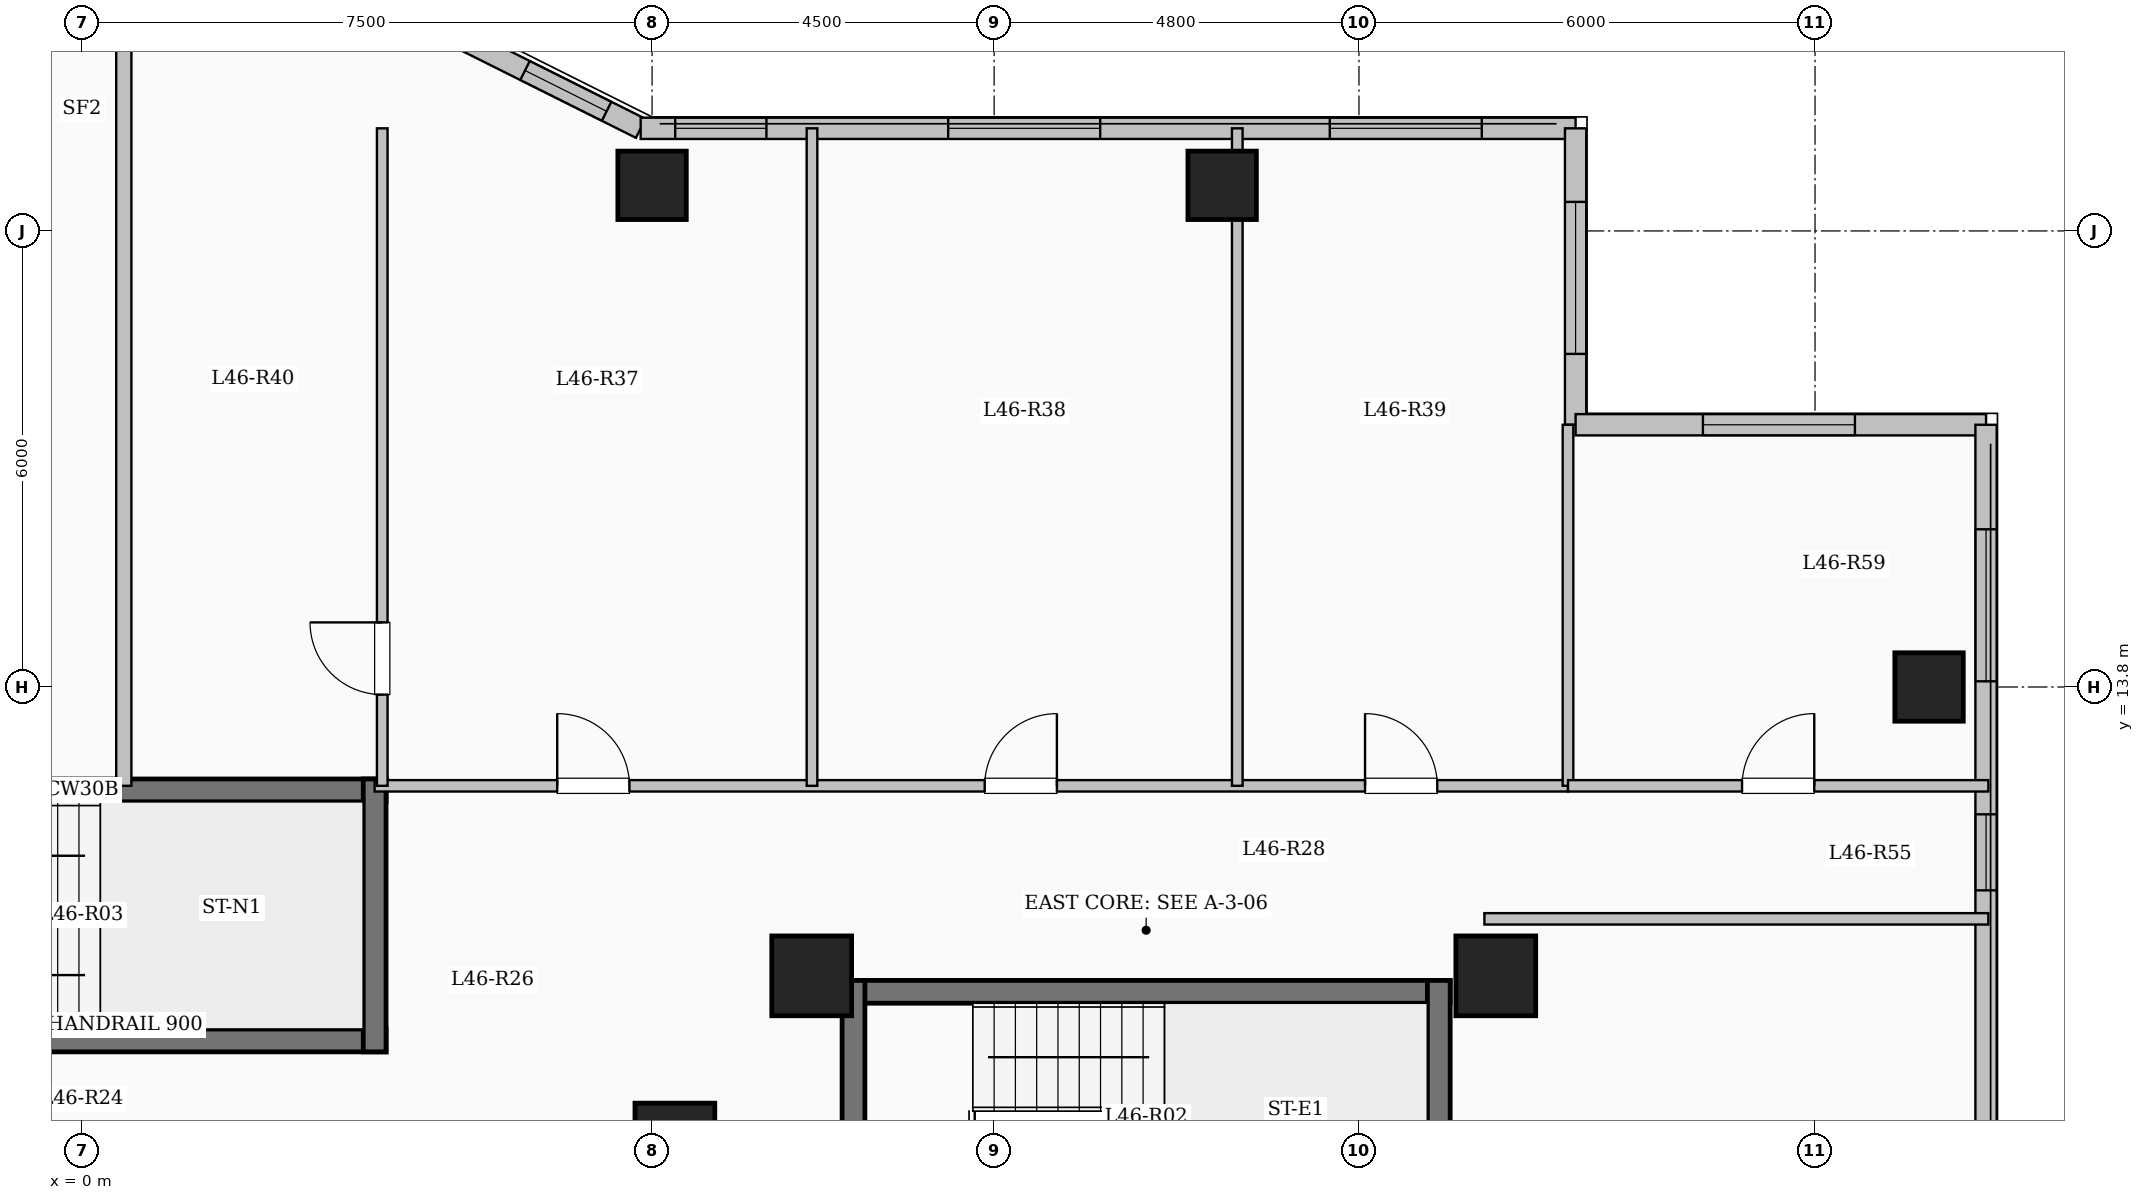
"""IFC4 building model, lengths in metres.
Left out: names, types, materials, properties, quantities, classifications, styles, units other than length and angle.
Written with IfcOpenShell. Run it as: python <this file> out.ifc"""

import sys

from ifc_helpers import new_model, si_unit, direction, frame, frame_2d, origin, origin_2d, place, context, subcontext, project, spatial, rectangle, extrude, element, fill, save


model = new_model("IFC4")
c1 = context("Model", 3, precision=1e-05, world=origin(), true_north=direction((0.0, 1.0)))
c2 = subcontext(c1, "Body", "Model", "MODEL_VIEW")
j1 = project(units=[si_unit("LENGTHUNIT", "METRE"), si_unit("PLANEANGLEUNIT", "RADIAN")], contexts=[c1])
p1 = place(None, origin())
s1 = spatial("IfcSite", under=j1, at=p1, CompositionType="ELEMENT")
p2 = place(p1, origin())
s2 = spatial("IfcBuilding", under=s1, at=p2, CompositionType="ELEMENT")
p3 = place(p2, frame((0.0, 0.0, 169.45)))
s3 = spatial("IfcBuildingStorey", under=s2, at=p3, CompositionType="ELEMENT", Elevation=169.45)
for number, where, z_axis, x_axis in (
    (1, (7.8, 7.8, 0.0), (0.0, 0.0, 1.0), (1.0, 0.0, 0.0)),
    (2, (9.6, 10.0, 0.0), (0.0, 0.0, 1.0), (1.0, 0.0, 0.0)),
    (3, (18.6, 10.0, 0.0), (0.0, 0.0, 1.0), (1.0, 0.0, 0.0)),
):
    element("IfcColumn", number, at=place(p3, frame(where, z_axis=z_axis, x_axis=x_axis)), inside=s3, PredefinedType="COLUMN", context=c2, shape_type="SweptSolid", body=[
        extrude(rectangle(XDim=1.05, YDim=1.05, at=origin_2d()), origin(), (0.0, 0.0, 1.0), 3.35),
    ])
for number, where, z_axis, x_axis in (
    (4, (7.5, 20.4, 0.0), (0.0, 0.0, 1.0), (1.0, 0.0, 0.0)),
    (5, (15.0, 20.4, 0.0), (0.0, 0.0, 1.0), (1.0, 0.0, 0.0)),
    (6, (24.3, 13.8, 0.0), (0.0, 0.0, 1.0), (1.0, 0.0, 0.0)),
):
    element("IfcColumn", number, at=place(p3, frame(where, z_axis=z_axis, x_axis=x_axis)), inside=s3, PredefinedType="COLUMN", context=c2, shape_type="SweptSolid", body=[
        extrude(rectangle(XDim=0.9, YDim=0.9, at=origin_2d()), origin(), (0.0, 0.0, 1.0), 3.35),
    ])
p4 = place(p3, frame((4.35, 22.65, 0.0), z_axis=(0.0, 0.0, 1.0), x_axis=(0.894427191, -0.4472135955, 0.0)))
e7 = element("IfcWall", 7, at=p4, inside=s3, PredefinedType="SOLIDWALL", context=c2, shape_type="SweptSolid", body=[
    extrude(rectangle(XDim=3.354, YDim=0.28, at=frame_2d((1.677, 0.0))), origin(), (0.0, 0.0, 1.0), 3.05),
])
p5 = place(p4, frame((1.653, 0.0, 0.95)))
e8 = element("IfcOpeningElement", 8, at=p5, cuts=e7, PredefinedType="OPENING", context=c2, shape_type="SweptSolid", body=[
    extrude(rectangle(XDim=1.2, YDim=1.5, at=frame_2d((0.6, 0.75))), frame((0.0, 0.15, 0.0), z_axis=(0.0, -1.0, 0.0), x_axis=(1.0, 0.0, 0.0)), (0.0, 0.0, 1.0), 0.3),
])
p6 = place(p3, frame((7.35, 21.15, 0.0), z_axis=(0.0, 0.0, 1.0), x_axis=(1.0, 0.0, 0.0)))
e9 = element("IfcWall", 9, at=p6, inside=s3, PredefinedType="SOLIDWALL", context=c2, shape_type="SweptSolid", body=[
    extrude(rectangle(XDim=12.3, YDim=0.28, at=frame_2d((6.15, 0.0))), origin(), (0.0, 0.0, 1.0), 3.05),
])
p7 = place(p6, frame((0.454, 0.0, 0.95)))
e10 = element("IfcOpeningElement", 10, at=p7, cuts=e9, PredefinedType="OPENING", context=c2, shape_type="SweptSolid", body=[
    extrude(rectangle(XDim=1.2, YDim=1.5, at=frame_2d((0.6, 0.75))), frame((0.0, 0.15, 0.0), z_axis=(0.0, -1.0, 0.0), x_axis=(1.0, 0.0, 0.0)), (0.0, 0.0, 1.0), 0.3),
])
p8 = place(p6, frame((4.045, 0.0, 0.9)))
e11 = element("IfcOpeningElement", 11, at=p8, cuts=e9, PredefinedType="OPENING", context=c2, shape_type="SweptSolid", body=[
    extrude(rectangle(XDim=2.0, YDim=1.7, at=frame_2d((1.0, 0.85))), frame((0.0, 0.15, 0.0), z_axis=(0.0, -1.0, 0.0), x_axis=(1.0, 0.0, 0.0)), (0.0, 0.0, 1.0), 0.3),
])
p9 = place(p6, frame((9.066, 0.0, 0.9)))
e12 = element("IfcOpeningElement", 12, at=p9, cuts=e9, PredefinedType="OPENING", context=c2, shape_type="SweptSolid", body=[
    extrude(rectangle(XDim=2.0, YDim=1.7, at=frame_2d((1.0, 0.85))), frame((0.0, 0.15, 0.0), z_axis=(0.0, -1.0, 0.0), x_axis=(1.0, 0.0, 0.0)), (0.0, 0.0, 1.0), 0.3),
])
p10 = place(p3, frame((19.65, 21.15, 0.0), z_axis=(0.0, 0.0, 1.0), x_axis=(0.0, -1.0, 0.0)))
e13 = element("IfcWall", 13, at=p10, inside=s3, PredefinedType="SOLIDWALL", context=c2, shape_type="SweptSolid", body=[
    extrude(rectangle(XDim=3.9, YDim=0.28, at=frame_2d((1.95, 0.0))), origin(), (0.0, 0.0, 1.0), 3.05),
])
p11 = place(p10, frame((0.968, 0.0, 0.9)))
e14 = element("IfcOpeningElement", 14, at=p11, cuts=e13, PredefinedType="OPENING", context=c2, shape_type="SweptSolid", body=[
    extrude(rectangle(XDim=2.0, YDim=1.7, at=frame_2d((1.0, 0.85))), frame((0.0, 0.15, 0.0), z_axis=(0.0, -1.0, 0.0), x_axis=(1.0, 0.0, 0.0)), (0.0, 0.0, 1.0), 0.3),
])
p12 = place(p3, frame((19.65, 17.25, 0.0), z_axis=(0.0, 0.0, 1.0), x_axis=(1.0, 0.0, 0.0)))
e15 = element("IfcWall", 15, at=p12, inside=s3, PredefinedType="SOLIDWALL", context=c2, shape_type="SweptSolid", body=[
    extrude(rectangle(XDim=5.4, YDim=0.28, at=frame_2d((2.7, 0.0))), origin(), (0.0, 0.0, 1.0), 3.05),
])
p13 = place(p12, frame((1.675, 0.0, 0.9)))
e16 = element("IfcOpeningElement", 16, at=p13, cuts=e15, PredefinedType="OPENING", context=c2, shape_type="SweptSolid", body=[
    extrude(rectangle(XDim=2.0, YDim=1.7, at=frame_2d((1.0, 0.85))), frame((0.0, 0.15, 0.0), z_axis=(0.0, -1.0, 0.0), x_axis=(1.0, 0.0, 0.0)), (0.0, 0.0, 1.0), 0.3),
])
p14 = place(p3, frame((25.05, 17.25, 0.0), z_axis=(0.0, 0.0, 1.0), x_axis=(0.0, -1.0, 0.0)))
e17 = element("IfcWall", 17, at=p14, inside=s3, PredefinedType="SOLIDWALL", context=c2, shape_type="SweptSolid", body=[
    extrude(rectangle(XDim=34.5, YDim=0.28, at=frame_2d((17.25, 0.0))), origin(), (0.0, 0.0, 1.0), 3.05),
])
p15 = place(p14, frame((1.375, 0.0, 0.9)))
e18 = element("IfcOpeningElement", 18, at=p15, cuts=e17, PredefinedType="OPENING", context=c2, shape_type="SweptSolid", body=[
    extrude(rectangle(XDim=2.0, YDim=1.7, at=frame_2d((1.0, 0.85))), frame((0.0, 0.15, 0.0), z_axis=(0.0, -1.0, 0.0), x_axis=(1.0, 0.0, 0.0)), (0.0, 0.0, 1.0), 0.3),
])
p16 = place(p14, frame((5.125, 0.0, 0.95)))
e19 = element("IfcOpeningElement", 19, at=p16, cuts=e17, PredefinedType="OPENING", context=c2, shape_type="SweptSolid", body=[
    extrude(rectangle(XDim=1.0, YDim=1.5, at=frame_2d((0.5, 0.75))), frame((0.0, 0.15, 0.0), z_axis=(0.0, -1.0, 0.0), x_axis=(1.0, 0.0, 0.0)), (0.0, 0.0, 1.0), 0.3),
])
p17 = place(p14, frame((14.5, 0.0, 0.9)))
e20 = element("IfcOpeningElement", 20, at=p17, cuts=e17, PredefinedType="OPENING", context=c2, shape_type="SweptSolid", body=[
    extrude(rectangle(XDim=2.0, YDim=1.7, at=frame_2d((1.0, 0.85))), frame((0.0, 0.15, 0.0), z_axis=(0.0, -1.0, 0.0), x_axis=(1.0, 0.0, 0.0)), (0.0, 0.0, 1.0), 0.3),
])
p18 = place(p14, frame((25.258, 0.0, 0.9)))
e21 = element("IfcOpeningElement", 21, at=p18, cuts=e17, PredefinedType="OPENING", context=c2, shape_type="SweptSolid", body=[
    extrude(rectangle(XDim=1.5, YDim=1.65, at=frame_2d((0.75, 0.825))), frame((0.0, 0.15, 0.0), z_axis=(0.0, -1.0, 0.0), x_axis=(1.0, 0.0, 0.0)), (0.0, 0.0, 1.0), 0.3),
])
p19 = place(p14, frame((29.95, 0.0, 0.9)))
e22 = element("IfcOpeningElement", 22, at=p19, cuts=e17, PredefinedType="OPENING", context=c2, shape_type="SweptSolid", body=[
    extrude(rectangle(XDim=2.2, YDim=1.75, at=frame_2d((1.1, 0.875))), frame((0.0, 0.15, 0.0), z_axis=(0.0, -1.0, 0.0), x_axis=(1.0, 0.0, 0.0)), (0.0, 0.0, 1.0), 0.3),
])
p20 = place(p3, frame((10.0, 9.79, 0.0), z_axis=(0.0, 0.0, 1.0), x_axis=(1.0, 0.0, 0.0)))
e23 = element("IfcWall", 23, at=p20, inside=s3, PredefinedType="SHEAR", context=c2, shape_type="SweptSolid", body=[
    extrude(rectangle(XDim=8.0, YDim=0.3, at=frame_2d((4.0, 0.0))), origin(), (0.0, 0.0, 1.0), 3.35),
])
for number, where, z_axis, x_axis in (
    (24, (10.15, 6.35, 0.0), (0.0, 0.0, 1.0), (0.0, 1.0, 0.0)),
    (25, (17.85, 6.35, 0.0), (0.0, 0.0, 1.0), (0.0, 1.0, 0.0)),
):
    element("IfcWall", number, at=place(p3, frame(where, z_axis=z_axis, x_axis=x_axis)), inside=s3, PredefinedType="SHEAR", context=c2, shape_type="SweptSolid", body=[
        extrude(rectangle(XDim=3.59, YDim=0.3, at=frame_2d((1.795, 0.0))), origin(), (0.0, 0.0, 1.0), 3.35),
    ])
p21 = place(p3, frame((-4.0, 12.44, 0.0), z_axis=(0.0, 0.0, 1.0), x_axis=(1.0, 0.0, 0.0)))
e26 = element("IfcWall", 26, at=p21, inside=s3, PredefinedType="SHEAR", context=c2, shape_type="SweptSolid", body=[
    extrude(rectangle(XDim=8.0, YDim=0.3, at=frame_2d((4.0, 0.0))), origin(), (0.0, 0.0, 1.0), 3.35),
])
p22 = place(p3, frame((-4.0, 9.15, 0.0), z_axis=(0.0, 0.0, 1.0), x_axis=(1.0, 0.0, 0.0)))
e27 = element("IfcWall", 27, at=p22, inside=s3, PredefinedType="SHEAR", context=c2, shape_type="SweptSolid", body=[
    extrude(rectangle(XDim=8.0, YDim=0.3, at=frame_2d((4.0, 0.0))), origin(), (0.0, 0.0, 1.0), 3.35),
])
p23 = place(p22, frame((0.55, 0.0, 0.0)))
e28 = element("IfcOpeningElement", 28, at=p23, cuts=e27, PredefinedType="OPENING", context=c2, shape_type="SweptSolid", body=[
    extrude(rectangle(XDim=1.0, YDim=2.15, at=frame_2d((0.5, 1.075))), frame((0.0, 0.16, 0.0), z_axis=(0.0, -1.0, 0.0), x_axis=(1.0, 0.0, 0.0)), (0.0, 0.0, 1.0), 0.32),
])
p24 = place(p3, frame((3.85, 9.0, 0.0), z_axis=(0.0, 0.0, 1.0), x_axis=(0.0, 1.0, 0.0)))
e29 = element("IfcWall", 29, at=p24, inside=s3, PredefinedType="SHEAR", context=c2, shape_type="SweptSolid", body=[
    extrude(rectangle(XDim=3.59, YDim=0.3, at=frame_2d((1.795, 0.0))), origin(), (0.0, 0.0, 1.0), 3.35),
])
p25 = place(p3, frame((3.85, 12.5, 0.0), z_axis=(0.0, 0.0, 1.0), x_axis=(1.0, 0.0, 0.0)))
e30 = element("IfcWall", 30, at=p25, inside=s3, PredefinedType="PARTITIONING", context=c2, shape_type="SweptSolid", body=[
    extrude(rectangle(XDim=15.7, YDim=0.15, at=frame_2d((7.85, 0.0))), origin(), (0.0, 0.0, 1.0), 3.05),
])
p26 = place(p25, frame((2.402, 0.0, 0.0)))
e31 = element("IfcOpeningElement", 31, at=p26, cuts=e30, PredefinedType="OPENING", context=c2, shape_type="SweptSolid", body=[
    extrude(rectangle(XDim=0.95, YDim=2.15, at=frame_2d((0.475, 1.075))), frame((0.0, 0.085, 0.0), z_axis=(0.0, -1.0, 0.0), x_axis=(1.0, 0.0, 0.0)), (0.0, 0.0, 1.0), 0.17),
])
p27 = place(p25, frame((8.026, 0.0, 0.0)))
e32 = element("IfcOpeningElement", 32, at=p27, cuts=e30, PredefinedType="OPENING", context=c2, shape_type="SweptSolid", body=[
    extrude(rectangle(XDim=0.95, YDim=2.15, at=frame_2d((0.475, 1.075))), frame((0.0, 0.085, 0.0), z_axis=(0.0, -1.0, 0.0), x_axis=(1.0, 0.0, 0.0)), (0.0, 0.0, 1.0), 0.17),
])
p28 = place(p25, frame((13.03, 0.0, 0.0)))
e33 = element("IfcOpeningElement", 33, at=p28, cuts=e30, PredefinedType="OPENING", context=c2, shape_type="SweptSolid", body=[
    extrude(rectangle(XDim=0.95, YDim=2.15, at=frame_2d((0.475, 1.075))), frame((0.0, 0.085, 0.0), z_axis=(0.0, -1.0, 0.0), x_axis=(1.0, 0.0, 0.0)), (0.0, 0.0, 1.0), 0.17),
])
p29 = place(p3, frame((0.55, 12.5, 0.0), z_axis=(0.0, 0.0, 1.0), x_axis=(0.0, 1.0, 0.0)))
e34 = element("IfcWall", 34, at=p29, inside=s3, PredefinedType="SOLIDWALL", context=c2, shape_type="SweptSolid", body=[
    extrude(rectangle(XDim=10.18, YDim=0.2, at=frame_2d((5.09, 0.0))), origin(), (0.0, 0.0, 1.0), 3.05),
])
p30 = place(p3, frame((3.95, 12.5, 0.0), z_axis=(0.0, 0.0, 1.0), x_axis=(0.0, 1.0, 0.0)))
e35 = element("IfcWall", 35, at=p30, inside=s3, PredefinedType="PARTITIONING", context=c2, shape_type="SweptSolid", body=[
    extrude(rectangle(XDim=8.65, YDim=0.14, at=frame_2d((4.325, 0.0))), origin(), (0.0, 0.0, 1.0), 3.05),
])
p31 = place(p30, frame((1.2, 0.0, 0.0)))
e36 = element("IfcOpeningElement", 36, at=p31, cuts=e35, PredefinedType="OPENING", context=c2, shape_type="SweptSolid", body=[
    extrude(rectangle(XDim=0.95, YDim=2.15, at=frame_2d((0.475, 1.075))), frame((0.0, 0.08, 0.0), z_axis=(0.0, -1.0, 0.0), x_axis=(1.0, 0.0, 0.0)), (0.0, 0.0, 1.0), 0.16),
])
p32 = place(p3, frame((9.604, 12.5, 0.0), z_axis=(0.0, 0.0, 1.0), x_axis=(0.0, 1.0, 0.0)))
e37 = element("IfcWall", 37, at=p32, inside=s3, PredefinedType="PARTITIONING", context=c2, shape_type="SweptSolid", body=[
    extrude(rectangle(XDim=8.65, YDim=0.14, at=frame_2d((4.325, 0.0))), origin(), (0.0, 0.0, 1.0), 3.05),
])
p33 = place(p3, frame((15.199, 12.5, 0.0), z_axis=(0.0, 0.0, 1.0), x_axis=(0.0, 1.0, 0.0)))
e38 = element("IfcWall", 38, at=p33, inside=s3, PredefinedType="PARTITIONING", context=c2, shape_type="SweptSolid", body=[
    extrude(rectangle(XDim=8.65, YDim=0.14, at=frame_2d((4.325, 0.0))), origin(), (0.0, 0.0, 1.0), 2.535),
])
p34 = place(p3, frame((18.45, 10.75, 0.0), z_axis=(0.0, 0.0, 1.0), x_axis=(1.0, 0.0, 0.0)))
e39 = element("IfcWall", 39, at=p34, inside=s3, PredefinedType="PARTITIONING", context=c2, shape_type="SweptSolid", body=[
    extrude(rectangle(XDim=6.63, YDim=0.15, at=frame_2d((3.315, 0.0))), origin(), (0.0, 0.0, 1.0), 3.05),
])
p35 = place(p3, frame((19.55, 12.5, 0.0), z_axis=(0.0, 0.0, 1.0), x_axis=(0.0, 1.0, 0.0)))
e40 = element("IfcWall", 40, at=p35, inside=s3, PredefinedType="PARTITIONING", context=c2, shape_type="SweptSolid", body=[
    extrude(rectangle(XDim=4.75, YDim=0.14, at=frame_2d((2.375, 0.0))), origin(), (0.0, 0.0, 1.0), 3.05),
])
p36 = place(p3, frame((19.55, 12.5, 0.0), z_axis=(0.0, 0.0, 1.0), x_axis=(1.0, 0.0, 0.0)))
e41 = element("IfcWall", 41, at=p36, inside=s3, PredefinedType="PARTITIONING", context=c2, shape_type="SweptSolid", body=[
    extrude(rectangle(XDim=5.53, YDim=0.15, at=frame_2d((2.765, 0.0))), origin(), (0.0, 0.0, 1.0), 3.05),
])
p37 = place(p36, frame((2.29, 0.0, 0.0)))
e42 = element("IfcOpeningElement", 42, at=p37, cuts=e41, PredefinedType="OPENING", context=c2, shape_type="SweptSolid", body=[
    extrude(rectangle(XDim=0.95, YDim=2.15, at=frame_2d((0.475, 1.075))), frame((0.0, 0.085, 0.0), z_axis=(0.0, -1.0, 0.0), x_axis=(1.0, 0.0, 0.0)), (0.0, 0.0, 1.0), 0.17),
])
p38 = place(p5, origin())
e43 = element("IfcWindow", 43, at=p38, inside=s3, PartitioningType="SINGLE_PANEL", PredefinedType="WINDOW", context=c2, shape_type="SweptSolid", body=[
    extrude(rectangle(XDim=1.2, YDim=1.5, at=frame_2d((0.6, 0.75))), frame((0.0, 0.03, 0.0), z_axis=(0.0, -1.0, 0.0), x_axis=(1.0, 0.0, 0.0)), (0.0, 0.0, 1.0), 0.06),
])
fill(e8, e43)
p39 = place(p7, origin())
e44 = element("IfcWindow", 44, at=p39, inside=s3, PartitioningType="SINGLE_PANEL", PredefinedType="WINDOW", context=c2, shape_type="SweptSolid", body=[
    extrude(rectangle(XDim=1.2, YDim=1.5, at=frame_2d((0.6, 0.75))), frame((0.0, 0.03, 0.0), z_axis=(0.0, -1.0, 0.0), x_axis=(1.0, 0.0, 0.0)), (0.0, 0.0, 1.0), 0.06),
])
fill(e10, e44)
p40 = place(p8, origin())
e45 = element("IfcWindow", 45, at=p40, inside=s3, PartitioningType="SINGLE_PANEL", PredefinedType="WINDOW", context=c2, shape_type="SweptSolid", body=[
    extrude(rectangle(XDim=2.0, YDim=1.7, at=frame_2d((1.0, 0.85))), frame((0.0, 0.03, 0.0), z_axis=(0.0, -1.0, 0.0), x_axis=(1.0, 0.0, 0.0)), (0.0, 0.0, 1.0), 0.06),
])
fill(e11, e45)
p41 = place(p9, origin())
e46 = element("IfcWindow", 46, at=p41, inside=s3, PartitioningType="SINGLE_PANEL", PredefinedType="WINDOW", context=c2, shape_type="SweptSolid", body=[
    extrude(rectangle(XDim=2.0, YDim=1.7, at=frame_2d((1.0, 0.85))), frame((0.0, 0.03, 0.0), z_axis=(0.0, -1.0, 0.0), x_axis=(1.0, 0.0, 0.0)), (0.0, 0.0, 1.0), 0.06),
])
fill(e12, e46)
p42 = place(p11, origin())
e47 = element("IfcWindow", 47, at=p42, inside=s3, PartitioningType="SINGLE_PANEL", PredefinedType="WINDOW", context=c2, shape_type="SweptSolid", body=[
    extrude(rectangle(XDim=2.0, YDim=1.7, at=frame_2d((1.0, 0.85))), frame((0.0, 0.03, 0.0), z_axis=(0.0, -1.0, 0.0), x_axis=(1.0, 0.0, 0.0)), (0.0, 0.0, 1.0), 0.06),
])
fill(e14, e47)
p43 = place(p13, origin())
e48 = element("IfcWindow", 48, at=p43, inside=s3, PartitioningType="SINGLE_PANEL", PredefinedType="WINDOW", context=c2, shape_type="SweptSolid", body=[
    extrude(rectangle(XDim=2.0, YDim=1.7, at=frame_2d((1.0, 0.85))), frame((0.0, 0.03, 0.0), z_axis=(0.0, -1.0, 0.0), x_axis=(1.0, 0.0, 0.0)), (0.0, 0.0, 1.0), 0.06),
])
fill(e16, e48)
p44 = place(p15, origin())
e49 = element("IfcWindow", 49, at=p44, inside=s3, PartitioningType="SINGLE_PANEL", PredefinedType="WINDOW", context=c2, shape_type="SweptSolid", body=[
    extrude(rectangle(XDim=2.0, YDim=1.7, at=frame_2d((1.0, 0.85))), frame((0.0, 0.03, 0.0), z_axis=(0.0, -1.0, 0.0), x_axis=(1.0, 0.0, 0.0)), (0.0, 0.0, 1.0), 0.06),
])
fill(e18, e49)
p45 = place(p16, origin())
e50 = element("IfcWindow", 50, at=p45, inside=s3, PartitioningType="SINGLE_PANEL", PredefinedType="WINDOW", context=c2, shape_type="SweptSolid", body=[
    extrude(rectangle(XDim=1.0, YDim=1.5, at=frame_2d((0.5, 0.75))), frame((0.0, 0.03, 0.0), z_axis=(0.0, -1.0, 0.0), x_axis=(1.0, 0.0, 0.0)), (0.0, 0.0, 1.0), 0.06),
])
fill(e19, e50)
p46 = place(p26, origin())
e51 = element("IfcDoor", 51, at=p46, inside=s3, OperationType="SINGLE_SWING_LEFT", PredefinedType="DOOR", context=c2, shape_type="SweptSolid", body=[
    extrude(rectangle(XDim=0.95, YDim=2.15, at=frame_2d((0.475, 1.075))), frame((0.0, 0.025, 0.0), z_axis=(0.0, -1.0, 0.0), x_axis=(1.0, 0.0, 0.0)), (0.0, 0.0, 1.0), 0.05),
])
fill(e31, e51)
p47 = place(p27, origin())
e52 = element("IfcDoor", 52, at=p47, inside=s3, OperationType="SINGLE_SWING_RIGHT", PredefinedType="DOOR", context=c2, shape_type="SweptSolid", body=[
    extrude(rectangle(XDim=0.95, YDim=2.15, at=frame_2d((0.475, 1.075))), frame((0.0, 0.025, 0.0), z_axis=(0.0, -1.0, 0.0), x_axis=(1.0, 0.0, 0.0)), (0.0, 0.0, 1.0), 0.05),
])
fill(e32, e52)
p48 = place(p28, origin())
e53 = element("IfcDoor", 53, at=p48, inside=s3, OperationType="SINGLE_SWING_LEFT", PredefinedType="DOOR", context=c2, shape_type="SweptSolid", body=[
    extrude(rectangle(XDim=0.95, YDim=2.15, at=frame_2d((0.475, 1.075))), frame((0.0, 0.025, 0.0), z_axis=(0.0, -1.0, 0.0), x_axis=(1.0, 0.0, 0.0)), (0.0, 0.0, 1.0), 0.05),
])
fill(e33, e53)
p49 = place(p31, origin())
e54 = element("IfcDoor", 54, at=p49, inside=s3, OperationType="SINGLE_SWING_RIGHT", PredefinedType="DOOR", context=c2, shape_type="SweptSolid", body=[
    extrude(rectangle(XDim=0.95, YDim=2.15, at=frame_2d((0.475, 1.075))), frame((0.0, 0.025, 0.0), z_axis=(0.0, -1.0, 0.0), x_axis=(1.0, 0.0, 0.0)), (0.0, 0.0, 1.0), 0.05),
])
fill(e36, e54)
p50 = place(p37, origin())
e55 = element("IfcDoor", 55, at=p50, inside=s3, OperationType="SINGLE_SWING_RIGHT", PredefinedType="DOOR", context=c2, shape_type="SweptSolid", body=[
    extrude(rectangle(XDim=0.95, YDim=2.15, at=frame_2d((0.475, 1.075))), frame((0.0, 0.025, 0.0), z_axis=(0.0, -1.0, 0.0), x_axis=(1.0, 0.0, 0.0)), (0.0, 0.0, 1.0), 0.05),
])
fill(e42, e55)
save(model, sys.argv[1])
